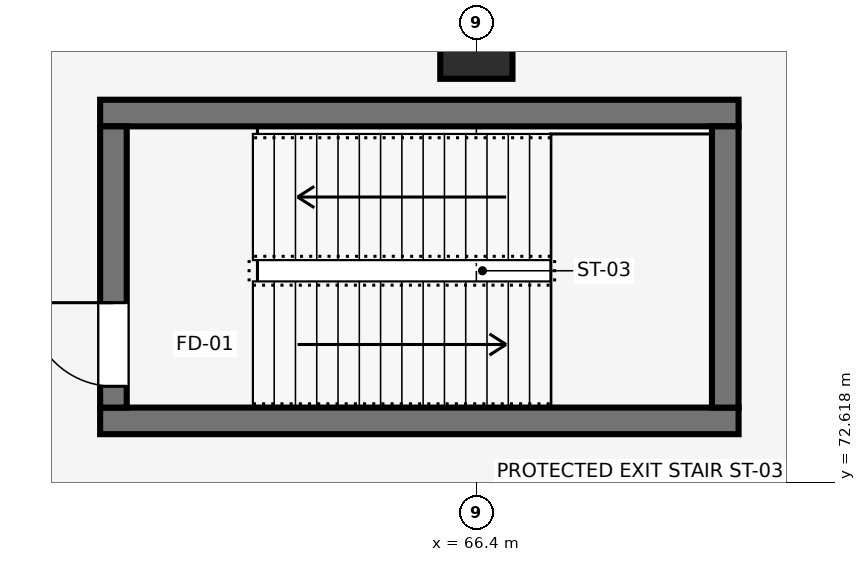
"""IFC4 building model, lengths in metres.
Left out: names, types, materials, properties, quantities, classifications, styles, units other than length and angle.
Written with IfcOpenShell. Run it as: python <this file> out.ifc"""

import sys

from ifc_helpers import new_model, si_unit, direction, frame, frame_2d, origin, origin_2d, place, context, subcontext, project, spatial, rectangle, extrude, element, fill, save


model = new_model("IFC4")
c1 = context("Model", 3, precision=1e-05, world=origin(), true_north=direction((0.0, 1.0)))
c2 = subcontext(c1, "Body", "Model", "MODEL_VIEW")
j1 = project(units=[si_unit("LENGTHUNIT", "METRE"), si_unit("PLANEANGLEUNIT", "RADIAN")], contexts=[c1])
p1 = place(None, origin())
s1 = spatial("IfcSite", under=j1, at=p1, CompositionType="ELEMENT")
p2 = place(p1, origin())
s2 = spatial("IfcBuilding", under=s1, at=p2, CompositionType="ELEMENT")
p3 = place(p2, origin())
s3 = spatial("IfcBuildingStorey", under=s2, at=p3, CompositionType="ELEMENT", Elevation=0.0)
p4 = place(p3, frame((66.4, 78.4, 0.0), z_axis=(0.0, 0.0, 1.0), x_axis=(1.0, 0.0, 0.0)))
e1 = element("IfcColumn", 1, at=p4, inside=s3, PredefinedType="COLUMN", context=c2, shape_type="SweptSolid", body=[
    extrude(rectangle(XDim=0.95, YDim=0.95, at=origin_2d()), origin(), (0.0, 0.0, 1.0), 5.4),
])
for number, where, z_axis, x_axis in (
    (2, (61.45, 73.425, 0.0), (0.0, 0.0, 1.0), (1.0, 0.0, 0.0)),
    (3, (69.85, 77.475, 0.0), (0.0, 0.0, 1.0), (-1.0, 0.0, 0.0)),
):
    element("IfcWall", number, at=place(p3, frame(where, z_axis=z_axis, x_axis=x_axis)), inside=s3, PredefinedType="SHEAR", context=c2, shape_type="SweptSolid", body=[
        extrude(rectangle(XDim=8.4, YDim=0.35, at=frame_2d((4.2, 0.0))), origin(), (0.0, 0.0, 1.0), 5.1),
    ])
p5 = place(p3, frame((61.625, 73.6, 0.0), z_axis=(0.0, 0.0, 1.0), x_axis=(0.0, 1.0, 0.0)))
e4 = element("IfcWall", 4, at=p5, inside=s3, PredefinedType="SHEAR", context=c2, shape_type="SweptSolid", body=[
    extrude(rectangle(XDim=3.7, YDim=0.35, at=frame_2d((1.85, 0.0))), origin(), (0.0, 0.0, 1.0), 5.1),
])
p6 = place(p5, frame((0.28, 0.0, 0.0)))
e5 = element("IfcOpeningElement", 5, at=p6, cuts=e4, PredefinedType="OPENING", context=c2, shape_type="SweptSolid", body=[
    extrude(rectangle(XDim=1.1, YDim=2.08, at=frame_2d((0.55, 1.04))), frame((0.0, 0.185, 0.0), z_axis=(0.0, -1.0, 0.0), x_axis=(1.0, 0.0, 0.0)), (0.0, 0.0, 1.0), 0.37),
])
p7 = place(p3, frame((69.675, 77.3, 0.0), z_axis=(0.0, 0.0, 1.0), x_axis=(0.0, -1.0, 0.0)))
e6 = element("IfcWall", 6, at=p7, inside=s3, PredefinedType="SHEAR", context=c2, shape_type="SweptSolid", body=[
    extrude(rectangle(XDim=3.7, YDim=0.35, at=frame_2d((1.85, 0.0))), origin(), (0.0, 0.0, 1.0), 5.1),
])
p8 = place(p6, origin())
e7 = element("IfcDoor", 7, at=p8, inside=s3, OperationType="SINGLE_SWING_RIGHT", PredefinedType="DOOR", context=c2, shape_type="SweptSolid", body=[
    extrude(rectangle(XDim=1.1, YDim=2.08, at=frame_2d((0.55, 1.04))), frame((0.0, 0.025, 0.0), z_axis=(0.0, -1.0, 0.0), x_axis=(1.0, 0.0, 0.0)), (0.0, 0.0, 1.0), 0.05),
])
fill(e5, e7)
save(model, sys.argv[1])
